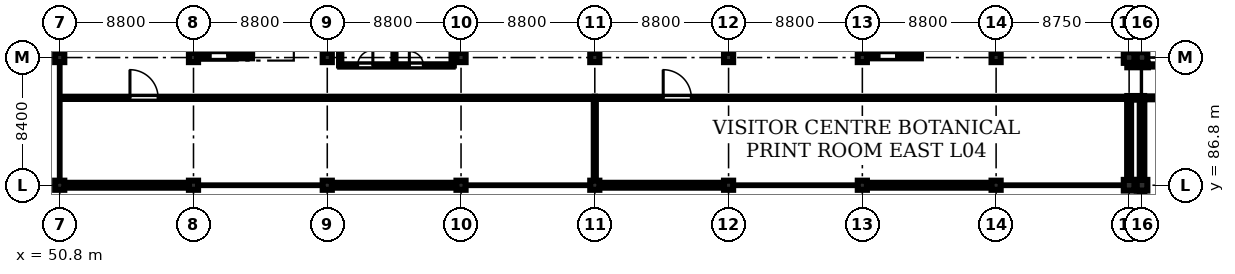
"""IFC4 building model, lengths in metres.
Left out: names, types, materials, properties, quantities, classifications, styles, units other than length and angle.
Written with IfcOpenShell. Run it as: python <this file> out.ifc"""

import sys

from ifc_helpers import new_model, si_unit, direction, frame, frame_2d, origin, origin_2d, place, context, subcontext, project, spatial, rectangle, extrude, element, fill, save


model = new_model("IFC4")
c1 = context("Model", 3, precision=1e-05, world=origin(), true_north=direction((0.0, 1.0)))
c2 = subcontext(c1, "Body", "Model", "MODEL_VIEW")
j1 = project(units=[si_unit("LENGTHUNIT", "METRE"), si_unit("PLANEANGLEUNIT", "RADIAN")], contexts=[c1])
p1 = place(None, origin())
s1 = spatial("IfcSite", under=j1, at=p1, CompositionType="ELEMENT")
p2 = place(p1, origin())
s2 = spatial("IfcBuilding", under=s1, at=p2, CompositionType="ELEMENT")
p3 = place(p2, frame((0.0, 0.0, 14.7)))
s3 = spatial("IfcBuildingStorey", under=s2, at=p3, CompositionType="ELEMENT", Elevation=14.7)
for number, where, z_axis, x_axis in (
    (1, (50.8, 86.8, 0.0), (0.0, 0.0, 1.0), (1.0, 0.0, 0.0)),
    (2, (50.8, 95.2, 0.0), (0.0, 0.0, 1.0), (1.0, 0.0, 0.0)),
    (3, (59.6, 86.8, 0.0), (0.0, 0.0, 1.0), (1.0, 0.0, 0.0)),
    (4, (59.6, 95.2, 0.0), (0.0, 0.0, 1.0), (1.0, 0.0, 0.0)),
    (5, (68.4, 86.8, 0.0), (0.0, 0.0, 1.0), (1.0, 0.0, 0.0)),
    (6, (68.4, 95.2, 0.0), (0.0, 0.0, 1.0), (1.0, 0.0, 0.0)),
    (7, (77.2, 86.8, 0.0), (0.0, 0.0, 1.0), (1.0, 0.0, 0.0)),
    (8, (77.2, 95.2, 0.0), (0.0, 0.0, 1.0), (1.0, 0.0, 0.0)),
    (9, (86.0, 86.8, 0.0), (0.0, 0.0, 1.0), (1.0, 0.0, 0.0)),
    (10, (86.0, 95.2, 0.0), (0.0, 0.0, 1.0), (1.0, 0.0, 0.0)),
    (11, (94.8, 86.8, 0.0), (0.0, 0.0, 1.0), (1.0, 0.0, 0.0)),
    (12, (94.8, 95.2, 0.0), (0.0, 0.0, 1.0), (1.0, 0.0, 0.0)),
    (13, (103.6, 86.8, 0.0), (0.0, 0.0, 1.0), (1.0, 0.0, 0.0)),
    (14, (103.6, 95.2, 0.0), (0.0, 0.0, 1.0), (1.0, 0.0, 0.0)),
    (15, (112.4, 86.8, 0.0), (0.0, 0.0, 1.0), (1.0, 0.0, 0.0)),
    (16, (112.4, 95.2, 0.0), (0.0, 0.0, 1.0), (1.0, 0.0, 0.0)),
):
    element("IfcColumn", number, at=place(p3, frame(where, z_axis=z_axis, x_axis=x_axis)), inside=s3, PredefinedType="COLUMN", context=c2, shape_type="SweptSolid", body=[
        extrude(rectangle(XDim=0.6, YDim=0.6, at=origin_2d()), origin(), (0.0, 0.0, 1.0), 4.5),
    ])
for number, where, z_axis, x_axis in (
    (17, (121.15, 86.8, 0.0), (0.0, 0.0, 1.0), (1.0, 0.0, 0.0)),
    (18, (121.15, 95.2, 0.0), (0.0, 0.0, 1.0), (1.0, 0.0, 0.0)),
):
    element("IfcColumn", number, at=place(p3, frame(where, z_axis=z_axis, x_axis=x_axis)), inside=s3, PredefinedType="COLUMN", context=c2, shape_type="SweptSolid", body=[
        extrude(rectangle(XDim=0.7, YDim=0.7, at=origin_2d()), origin(), (0.0, 0.0, 1.0), 4.5),
    ])
for number, where, z_axis, x_axis in (
    (19, (122.0, 86.8, 0.0), (0.0, 0.0, 1.0), (1.0, 0.0, 0.0)),
    (20, (122.0, 95.2, 0.0), (0.0, 0.0, 1.0), (1.0, 0.0, 0.0)),
):
    element("IfcColumn", number, at=place(p3, frame(where, z_axis=z_axis, x_axis=x_axis)), inside=s3, PredefinedType="COLUMN", context=c2, shape_type="SweptSolid", body=[
        extrude(rectangle(XDim=0.7, YDim=0.7, at=origin_2d()), origin(), (0.0, 0.0, 1.0), 4.26),
    ])
p4 = place(p3, frame((59.75, 95.3, 0.0), z_axis=(0.0, 0.0, 1.0), x_axis=(1.0, 0.0, 0.0)))
e21 = element("IfcWall", 21, at=p4, inside=s3, PredefinedType="SHEAR", context=c2, shape_type="SweptSolid", body=[
    extrude(rectangle(XDim=3.7, YDim=0.3, at=frame_2d((1.85, 0.0))), origin(), (0.0, 0.0, 1.0), 4.5),
])
p5 = place(p4, frame((0.95, 0.0, 0.0)))
e22 = element("IfcOpeningElement", 22, at=p5, cuts=e21, PredefinedType="OPENING", context=c2, shape_type="SweptSolid", body=[
    extrude(rectangle(XDim=1.15, YDim=2.15, at=frame_2d((0.575, 1.075))), frame((0.0, 0.16, 0.0), z_axis=(0.0, -1.0, 0.0), x_axis=(1.0, 0.0, 0.0)), (0.0, 0.0, 1.0), 0.32),
])
for number, where, z_axis, x_axis in (
    (23, (59.9, 95.45, 0.0), (0.0, 0.0, 1.0), (0.0, 1.0, 0.0)),
    (24, (63.3, 95.45, 0.0), (0.0, 0.0, 1.0), (0.0, 1.0, 0.0)),
):
    element("IfcWall", number, at=place(p3, frame(where, z_axis=z_axis, x_axis=x_axis)), inside=s3, PredefinedType="SHEAR", context=c2, shape_type="SweptSolid", body=[
        extrude(rectangle(XDim=7.9, YDim=0.3, at=frame_2d((3.95, 0.0))), origin(), (0.0, 0.0, 1.0), 4.5),
    ])
p6 = place(p3, frame((103.75, 95.3, 0.0), z_axis=(0.0, 0.0, 1.0), x_axis=(1.0, 0.0, 0.0)))
e25 = element("IfcWall", 25, at=p6, inside=s3, PredefinedType="SHEAR", context=c2, shape_type="SweptSolid", body=[
    extrude(rectangle(XDim=3.7, YDim=0.3, at=frame_2d((1.85, 0.0))), origin(), (0.0, 0.0, 1.0), 4.5),
])
p7 = place(p6, frame((0.95, 0.0, 0.0)))
e26 = element("IfcOpeningElement", 26, at=p7, cuts=e25, PredefinedType="OPENING", context=c2, shape_type="SweptSolid", body=[
    extrude(rectangle(XDim=1.15, YDim=2.15, at=frame_2d((0.575, 1.075))), frame((0.0, 0.16, 0.0), z_axis=(0.0, -1.0, 0.0), x_axis=(1.0, 0.0, 0.0)), (0.0, 0.0, 1.0), 0.32),
])
for number, where, z_axis, x_axis in (
    (27, (103.9, 95.45, 0.0), (0.0, 0.0, 1.0), (0.0, 1.0, 0.0)),
    (28, (107.3, 95.45, 0.0), (0.0, 0.0, 1.0), (0.0, 1.0, 0.0)),
):
    element("IfcWall", number, at=place(p3, frame(where, z_axis=z_axis, x_axis=x_axis)), inside=s3, PredefinedType="SHEAR", context=c2, shape_type="SweptSolid", body=[
        extrude(rectangle(XDim=7.9, YDim=0.3, at=frame_2d((3.95, 0.0))), origin(), (0.0, 0.0, 1.0), 4.5),
    ])
p8 = place(p3, frame((59.3, 86.8, 0.0), z_axis=(0.0, 0.0, 1.0), x_axis=(-1.0, 0.0, 0.0)))
e29 = element("IfcWall", 29, at=p8, inside=s3, PredefinedType="STANDARD", context=c2, shape_type="SweptSolid", body=[
    extrude(rectangle(XDim=8.2, YDim=0.32, at=frame_2d((4.1, 0.0))), origin(), (0.0, 0.0, 1.0), 4.125),
])
p9 = place(p8, frame((2.8, 0.0, 0.95)))
e30 = element("IfcOpeningElement", 30, at=p9, cuts=e29, PredefinedType="OPENING", context=c2, shape_type="SweptSolid", body=[
    extrude(rectangle(XDim=2.1, YDim=2.25, at=frame_2d((1.05, 1.125))), frame((0.0, 0.17, 0.0), z_axis=(0.0, -1.0, 0.0), x_axis=(1.0, 0.0, 0.0)), (0.0, 0.0, 1.0), 0.34),
])
p10 = place(p3, frame((76.9, 86.8, 0.0), z_axis=(0.0, 0.0, 1.0), x_axis=(-1.0, 0.0, 0.0)))
e31 = element("IfcWall", 31, at=p10, inside=s3, PredefinedType="STANDARD", context=c2, shape_type="SweptSolid", body=[
    extrude(rectangle(XDim=8.2, YDim=0.32, at=frame_2d((4.1, 0.0))), origin(), (0.0, 0.0, 1.0), 4.125),
])
p11 = place(p10, frame((2.8, 0.0, 0.95)))
e32 = element("IfcOpeningElement", 32, at=p11, cuts=e31, PredefinedType="OPENING", context=c2, shape_type="SweptSolid", body=[
    extrude(rectangle(XDim=2.1, YDim=2.25, at=frame_2d((1.05, 1.125))), frame((0.0, 0.17, 0.0), z_axis=(0.0, -1.0, 0.0), x_axis=(1.0, 0.0, 0.0)), (0.0, 0.0, 1.0), 0.34),
])
p12 = place(p3, frame((94.5, 86.8, 0.0), z_axis=(0.0, 0.0, 1.0), x_axis=(-1.0, 0.0, 0.0)))
e33 = element("IfcWall", 33, at=p12, inside=s3, PredefinedType="STANDARD", context=c2, shape_type="SweptSolid", body=[
    extrude(rectangle(XDim=8.2, YDim=0.32, at=frame_2d((4.1, 0.0))), origin(), (0.0, 0.0, 1.0), 4.125),
])
p13 = place(p12, frame((2.8, 0.0, 0.95)))
e34 = element("IfcOpeningElement", 34, at=p13, cuts=e33, PredefinedType="OPENING", context=c2, shape_type="SweptSolid", body=[
    extrude(rectangle(XDim=2.1, YDim=2.25, at=frame_2d((1.05, 1.125))), frame((0.0, 0.17, 0.0), z_axis=(0.0, -1.0, 0.0), x_axis=(1.0, 0.0, 0.0)), (0.0, 0.0, 1.0), 0.34),
])
p14 = place(p3, frame((112.1, 86.8, 0.0), z_axis=(0.0, 0.0, 1.0), x_axis=(-1.0, 0.0, 0.0)))
e35 = element("IfcWall", 35, at=p14, inside=s3, PredefinedType="STANDARD", context=c2, shape_type="SweptSolid", body=[
    extrude(rectangle(XDim=8.2, YDim=0.32, at=frame_2d((4.1, 0.0))), origin(), (0.0, 0.0, 1.0), 4.125),
])
p15 = place(p14, frame((2.8, 0.0, 0.95)))
e36 = element("IfcOpeningElement", 36, at=p15, cuts=e35, PredefinedType="OPENING", context=c2, shape_type="SweptSolid", body=[
    extrude(rectangle(XDim=2.1, YDim=2.25, at=frame_2d((1.05, 1.125))), frame((0.0, 0.17, 0.0), z_axis=(0.0, -1.0, 0.0), x_axis=(1.0, 0.0, 0.0)), (0.0, 0.0, 1.0), 0.34),
])
p16 = place(p3, frame((121.15, 92.42, 0.0), z_axis=(0.0, 0.0, 1.0), x_axis=(0.0, -1.0, 0.0)))
e37 = element("IfcWall", 37, at=p16, inside=s3, PredefinedType="STANDARD", context=c2, shape_type="SweptSolid", body=[
    extrude(rectangle(XDim=5.27, YDim=0.26, at=frame_2d((2.635, 0.0))), origin(), (0.0, 0.0, 1.0), 4.3),
])
p17 = place(p3, frame((121.15, 103.25, 0.0), z_axis=(0.0, 0.0, 1.0), x_axis=(0.0, -1.0, 0.0)))
e38 = element("IfcWall", 38, at=p17, inside=s3, PredefinedType="STANDARD", context=c2, shape_type="SweptSolid", body=[
    extrude(rectangle(XDim=7.7, YDim=0.26, at=frame_2d((3.85, 0.0))), origin(), (0.0, 0.0, 1.0), 4.3),
])
p18 = place(p3, frame((122.0, 78.75, 0.0), z_axis=(0.0, 0.0, 1.0), x_axis=(0.0, 1.0, 0.0)))
e39 = element("IfcWall", 39, at=p18, inside=s3, PredefinedType="STANDARD", context=c2, shape_type="SweptSolid", body=[
    extrude(rectangle(XDim=7.7, YDim=0.3, at=frame_2d((3.85, 0.0))), origin(), (0.0, 0.0, 1.0), 3.51),
])
p19 = place(p3, frame((122.0, 87.15, 0.0), z_axis=(0.0, 0.0, 1.0), x_axis=(0.0, 1.0, 0.0)))
e40 = element("IfcWall", 40, at=p19, inside=s3, PredefinedType="STANDARD", context=c2, shape_type="SweptSolid", body=[
    extrude(rectangle(XDim=5.27, YDim=0.3, at=frame_2d((2.635, 0.0))), origin(), (0.0, 0.0, 1.0), 3.51),
])
p20 = place(p3, frame((122.14, 92.55, 0.0), z_axis=(0.0, 0.0, 1.0), x_axis=(-1.0, 0.0, 0.0)))
e41 = element("IfcWall", 41, at=p20, inside=s3, PredefinedType="STANDARD", context=c2, shape_type="SweptSolid", body=[
    extrude(rectangle(XDim=1.11, YDim=0.24, at=frame_2d((0.555, 0.0))), origin(), (0.0, 0.0, 1.0), 4.26),
])
p21 = place(p3, frame((121.03, 94.68, 0.0), z_axis=(0.0, 0.0, 1.0), x_axis=(1.0, 0.0, 0.0)))
e42 = element("IfcWall", 42, at=p21, inside=s3, PredefinedType="STANDARD", context=c2, shape_type="SweptSolid", body=[
    extrude(rectangle(XDim=1.36, YDim=0.24, at=frame_2d((0.68, 0.0))), origin(), (0.0, 0.0, 1.0), 4.26),
])
p22 = place(p3, frame((122.0, 95.55, 0.0), z_axis=(0.0, 0.0, 1.0), x_axis=(0.0, 1.0, 0.0)))
e43 = element("IfcWall", 43, at=p22, inside=s3, PredefinedType="STANDARD", context=c2, shape_type="SweptSolid", body=[
    extrude(rectangle(XDim=7.7, YDim=0.3, at=frame_2d((3.85, 0.0))), origin(), (0.0, 0.0, 1.0), 3.51),
])
p23 = place(p3, frame((69.25, 94.68, 0.0), z_axis=(0.0, 0.0, 1.0), x_axis=(1.0, 0.0, 0.0)))
e44 = element("IfcWall", 44, at=p23, inside=s3, PredefinedType="PARTITIONING", context=c2, shape_type="SweptSolid", body=[
    extrude(rectangle(XDim=7.4, YDim=0.15, at=frame_2d((3.7, 0.0))), origin(), (0.0, 0.0, 1.0), 4.25),
])
p24 = place(p23, frame((1.15, 0.0, 0.0)))
e45 = element("IfcOpeningElement", 45, at=p24, cuts=e44, PredefinedType="OPENING", context=c2, shape_type="SweptSolid", body=[
    extrude(rectangle(XDim=1.0, YDim=2.12, at=frame_2d((0.5, 1.06))), frame((0.0, 0.085, 0.0), z_axis=(0.0, -1.0, 0.0), x_axis=(1.0, 0.0, 0.0)), (0.0, 0.0, 1.0), 0.17),
])
p25 = place(p23, frame((4.55, 0.0, 0.0)))
e46 = element("IfcOpeningElement", 46, at=p25, cuts=e44, PredefinedType="OPENING", context=c2, shape_type="SweptSolid", body=[
    extrude(rectangle(XDim=0.92, YDim=2.1, at=frame_2d((0.46, 1.05))), frame((0.0, 0.085, 0.0), z_axis=(0.0, -1.0, 0.0), x_axis=(1.0, 0.0, 0.0)), (0.0, 0.0, 1.0), 0.17),
])
p26 = place(p3, frame((69.25, 94.68, 0.0), z_axis=(0.0, 0.0, 1.0), x_axis=(0.0, 1.0, 0.0)))
e47 = element("IfcWall", 47, at=p26, inside=s3, PredefinedType="PARTITIONING", context=c2, shape_type="SweptSolid", body=[
    extrude(rectangle(XDim=8.57, YDim=0.15, at=frame_2d((4.285, 0.0))), origin(), (0.0, 0.0, 1.0), 4.25),
])
p27 = place(p3, frame((72.82, 94.68, 0.0), z_axis=(0.0, 0.0, 1.0), x_axis=(0.0, 1.0, 0.0)))
e48 = element("IfcWall", 48, at=p27, inside=s3, PredefinedType="PARTITIONING", context=c2, shape_type="SweptSolid", body=[
    extrude(rectangle(XDim=8.57, YDim=0.135, at=frame_2d((4.285, 0.0))), origin(), (0.0, 0.0, 1.0), 4.25),
])
p28 = place(p3, frame((76.65, 94.68, 0.0), z_axis=(0.0, 0.0, 1.0), x_axis=(0.0, 1.0, 0.0)))
e49 = element("IfcWall", 49, at=p28, inside=s3, PredefinedType="PARTITIONING", context=c2, shape_type="SweptSolid", body=[
    extrude(rectangle(XDim=8.57, YDim=0.15, at=frame_2d((4.285, 0.0))), origin(), (0.0, 0.0, 1.0), 4.25),
])
p29 = place(p3, frame((50.92, 92.55, 0.0), z_axis=(0.0, 0.0, 1.0), x_axis=(1.0, 0.0, 0.0)))
e50 = element("IfcWall", 50, at=p29, inside=s3, PredefinedType="PARTITIONING", context=c2, shape_type="SweptSolid", body=[
    extrude(rectangle(XDim=35.08, YDim=0.145, at=frame_2d((17.54, 0.0))), origin(), (0.0, 0.0, 1.0), 4.25),
])
p30 = place(p29, frame((4.5, 0.0, 0.0)))
e51 = element("IfcOpeningElement", 51, at=p30, cuts=e50, PredefinedType="OPENING", context=c2, shape_type="SweptSolid", body=[
    extrude(rectangle(XDim=1.85, YDim=2.25, at=frame_2d((0.925, 1.125))), frame((0.0, 0.083, 0.0), z_axis=(0.0, -1.0, 0.0), x_axis=(1.0, 0.0, 0.0)), (0.0, 0.0, 1.0), 0.165),
])
p31 = place(p3, frame((86.0, 92.55, 0.0), z_axis=(0.0, 0.0, 1.0), x_axis=(1.0, 0.0, 0.0)))
e52 = element("IfcWall", 52, at=p31, inside=s3, PredefinedType="PARTITIONING", context=c2, shape_type="SweptSolid", body=[
    extrude(rectangle(XDim=35.02, YDim=0.145, at=frame_2d((17.51, 0.0))), origin(), (0.0, 0.0, 1.0), 4.25),
])
p32 = place(p31, frame((4.5, 0.0, 0.0)))
e53 = element("IfcOpeningElement", 53, at=p32, cuts=e52, PredefinedType="OPENING", context=c2, shape_type="SweptSolid", body=[
    extrude(rectangle(XDim=1.85, YDim=2.25, at=frame_2d((0.925, 1.125))), frame((0.0, 0.083, 0.0), z_axis=(0.0, -1.0, 0.0), x_axis=(1.0, 0.0, 0.0)), (0.0, 0.0, 1.0), 0.165),
])
p33 = place(p3, frame((86.0, 86.95, 0.0), z_axis=(0.0, 0.0, 1.0), x_axis=(0.0, 1.0, 0.0)))
e54 = element("IfcWall", 54, at=p33, inside=s3, PredefinedType="PARTITIONING", context=c2, shape_type="SweptSolid", body=[
    extrude(rectangle(XDim=5.6, YDim=0.135, at=frame_2d((2.8, 0.0))), origin(), (0.0, 0.0, 1.0), 4.25),
])
p34 = place(p3, frame((122.4, 94.68, 0.0), z_axis=(0.0, 0.0, 1.0), x_axis=(1.0, 0.0, 0.0)))
e55 = element("IfcWall", 55, at=p34, inside=s3, PredefinedType="PARTITIONING", context=c2, shape_type="SweptSolid", body=[
    extrude(rectangle(XDim=13.8, YDim=0.145, at=frame_2d((6.9, 0.0))), origin(), (0.0, 0.0, 1.0), 4.26),
])
p35 = place(p34, frame((3.2, 0.0, 0.0)))
e56 = element("IfcOpeningElement", 56, at=p35, cuts=e55, PredefinedType="OPENING", context=c2, shape_type="SweptSolid", body=[
    extrude(rectangle(XDim=1.02, YDim=2.15, at=frame_2d((0.51, 1.075))), frame((0.0, 0.083, 0.0), z_axis=(0.0, -1.0, 0.0), x_axis=(1.0, 0.0, 0.0)), (0.0, 0.0, 1.0), 0.165),
])
p36 = place(p3, frame((122.15, 92.55, 0.0), z_axis=(0.0, 0.0, 1.0), x_axis=(1.0, 0.0, 0.0)))
e57 = element("IfcWall", 57, at=p36, inside=s3, PredefinedType="SOLIDWALL", context=c2, shape_type="SweptSolid", body=[
    extrude(rectangle(XDim=25.05, YDim=0.19, at=frame_2d((12.525, 0.0))), origin(), (0.0, 0.0, 1.0), 4.26),
])
p37 = place(p36, frame((3.75, 0.0, 0.0)))
e58 = element("IfcOpeningElement", 58, at=p37, cuts=e57, PredefinedType="OPENING", context=c2, shape_type="SweptSolid", body=[
    extrude(rectangle(XDim=1.38, YDim=2.22, at=frame_2d((0.69, 1.11))), frame((0.0, 0.105, 0.0), z_axis=(0.0, -1.0, 0.0), x_axis=(1.0, 0.0, 0.0)), (0.0, 0.0, 1.0), 0.21),
])
p38 = place(p9, origin())
e59 = element("IfcWindow", 59, at=p38, inside=s3, PartitioningType="DOUBLE_PANEL_VERTICAL", PredefinedType="WINDOW", context=c2, shape_type="SweptSolid", body=[
    extrude(rectangle(XDim=2.1, YDim=2.25, at=frame_2d((1.05, 1.125))), frame((0.0, 0.03, 0.0), z_axis=(0.0, -1.0, 0.0), x_axis=(1.0, 0.0, 0.0)), (0.0, 0.0, 1.0), 0.06),
])
fill(e30, e59)
p39 = place(p11, origin())
e60 = element("IfcWindow", 60, at=p39, inside=s3, PartitioningType="DOUBLE_PANEL_VERTICAL", PredefinedType="WINDOW", context=c2, shape_type="SweptSolid", body=[
    extrude(rectangle(XDim=2.1, YDim=2.25, at=frame_2d((1.05, 1.125))), frame((0.0, 0.03, 0.0), z_axis=(0.0, -1.0, 0.0), x_axis=(1.0, 0.0, 0.0)), (0.0, 0.0, 1.0), 0.06),
])
fill(e32, e60)
p40 = place(p13, origin())
e61 = element("IfcWindow", 61, at=p40, inside=s3, PartitioningType="DOUBLE_PANEL_VERTICAL", PredefinedType="WINDOW", context=c2, shape_type="SweptSolid", body=[
    extrude(rectangle(XDim=2.1, YDim=2.25, at=frame_2d((1.05, 1.125))), frame((0.0, 0.03, 0.0), z_axis=(0.0, -1.0, 0.0), x_axis=(1.0, 0.0, 0.0)), (0.0, 0.0, 1.0), 0.06),
])
fill(e34, e61)
p41 = place(p15, origin())
e62 = element("IfcWindow", 62, at=p41, inside=s3, PartitioningType="DOUBLE_PANEL_VERTICAL", PredefinedType="WINDOW", context=c2, shape_type="SweptSolid", body=[
    extrude(rectangle(XDim=2.1, YDim=2.25, at=frame_2d((1.05, 1.125))), frame((0.0, 0.03, 0.0), z_axis=(0.0, -1.0, 0.0), x_axis=(1.0, 0.0, 0.0)), (0.0, 0.0, 1.0), 0.06),
])
fill(e36, e62)
p42 = place(p24, origin())
e63 = element("IfcDoor", 63, at=p42, inside=s3, OperationType="SINGLE_SWING_RIGHT", PredefinedType="DOOR", context=c2, shape_type="SweptSolid", body=[
    extrude(rectangle(XDim=1.0, YDim=2.12, at=frame_2d((0.5, 1.06))), frame((0.0, 0.025, 0.0), z_axis=(0.0, -1.0, 0.0), x_axis=(1.0, 0.0, 0.0)), (0.0, 0.0, 1.0), 0.05),
])
fill(e45, e63)
p43 = place(p25, origin())
e64 = element("IfcDoor", 64, at=p43, inside=s3, OperationType="SINGLE_SWING_LEFT", PredefinedType="DOOR", context=c2, shape_type="SweptSolid", body=[
    extrude(rectangle(XDim=0.92, YDim=2.1, at=frame_2d((0.46, 1.05))), frame((0.0, 0.025, 0.0), z_axis=(0.0, -1.0, 0.0), x_axis=(1.0, 0.0, 0.0)), (0.0, 0.0, 1.0), 0.05),
])
fill(e46, e64)
p44 = place(p30, origin())
e65 = element("IfcDoor", 65, at=p44, inside=s3, OperationType="SINGLE_SWING_LEFT", PredefinedType="DOOR", context=c2, shape_type="SweptSolid", body=[
    extrude(rectangle(XDim=1.85, YDim=2.25, at=frame_2d((0.925, 1.125))), frame((0.0, 0.025, 0.0), z_axis=(0.0, -1.0, 0.0), x_axis=(1.0, 0.0, 0.0)), (0.0, 0.0, 1.0), 0.05),
])
fill(e51, e65)
p45 = place(p32, origin())
e66 = element("IfcDoor", 66, at=p45, inside=s3, OperationType="SINGLE_SWING_LEFT", PredefinedType="DOOR", context=c2, shape_type="SweptSolid", body=[
    extrude(rectangle(XDim=1.85, YDim=2.25, at=frame_2d((0.925, 1.125))), frame((0.0, 0.025, 0.0), z_axis=(0.0, -1.0, 0.0), x_axis=(1.0, 0.0, 0.0)), (0.0, 0.0, 1.0), 0.05),
])
fill(e53, e66)
p46 = place(p5, origin())
e67 = element("IfcDoor", 67, at=p46, inside=s3, OperationType="SINGLE_SWING_RIGHT", PredefinedType="DOOR", context=c2, shape_type="SweptSolid", body=[
    extrude(rectangle(XDim=1.15, YDim=2.15, at=frame_2d((0.575, 1.075))), frame((0.0, 0.025, 0.0), z_axis=(0.0, -1.0, 0.0), x_axis=(1.0, 0.0, 0.0)), (0.0, 0.0, 1.0), 0.05),
])
fill(e22, e67)
p47 = place(p7, origin())
e68 = element("IfcDoor", 68, at=p47, inside=s3, OperationType="SINGLE_SWING_RIGHT", PredefinedType="DOOR", context=c2, shape_type="SweptSolid", body=[
    extrude(rectangle(XDim=1.15, YDim=2.15, at=frame_2d((0.575, 1.075))), frame((0.0, 0.025, 0.0), z_axis=(0.0, -1.0, 0.0), x_axis=(1.0, 0.0, 0.0)), (0.0, 0.0, 1.0), 0.05),
])
fill(e26, e68)
save(model, sys.argv[1])
